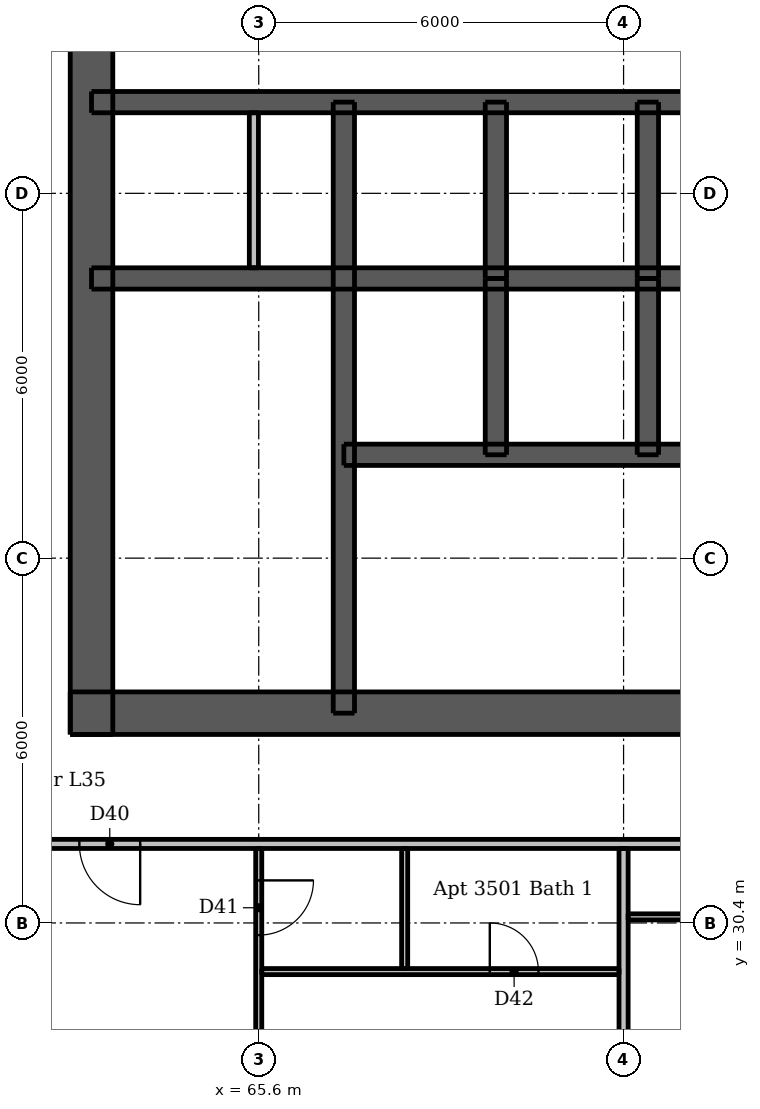
"""IFC4 building model, lengths in metres.
Left out: names, types, materials, properties, quantities, classifications, styles, units other than length and angle.
Written with IfcOpenShell. Run it as: python <this file> out.ifc"""

import sys

from ifc_helpers import new_model, si_unit, direction, frame, frame_2d, origin, place, context, subcontext, project, spatial, rectangle, extrude, element, fill, save


model = new_model("IFC4")
c1 = context("Model", 3, precision=1e-05, world=origin(), true_north=direction((0.0, 1.0)))
c2 = subcontext(c1, "Body", "Model", "MODEL_VIEW")
j1 = project(units=[si_unit("LENGTHUNIT", "METRE"), si_unit("PLANEANGLEUNIT", "RADIAN")], contexts=[c1])
p1 = place(None, origin())
s1 = spatial("IfcSite", under=j1, at=p1, CompositionType="ELEMENT")
p2 = place(p1, origin())
s2 = spatial("IfcBuilding", under=s1, at=p2, CompositionType="ELEMENT")
p3 = place(p2, frame((0.0, 0.0, 133.9)))
s3 = spatial("IfcBuildingStorey", under=s2, at=p3, CompositionType="ELEMENT", Elevation=133.9)
p4 = place(p3, frame((62.5, 33.85, 0.0), z_axis=(0.0, 0.0, 1.0), x_axis=(1.0, 0.0, 0.0)))
e1 = element("IfcWall", 1, at=p4, inside=s3, PredefinedType="SHEAR", context=c2, shape_type="SweptSolid", body=[
    extrude(rectangle(XDim=24.0, YDim=0.7, at=frame_2d((12.0, 0.0))), origin(), (0.0, 0.0, 1.0), 3.05),
])
p5 = place(p4, frame((1.962, 0.0, 0.0)))
e2 = element("IfcOpeningElement", 2, at=p5, cuts=e1, PredefinedType="OPENING", context=c2, shape_type="SweptSolid", body=[
    extrude(rectangle(XDim=1.1, YDim=2.1, at=frame_2d((0.55, 1.05))), frame((0.0, 0.36, 0.0), z_axis=(0.0, -1.0, 0.0), x_axis=(1.0, 0.0, 0.0)), (0.0, 0.0, 1.0), 0.72),
])
p6 = place(p4, frame((20.938, 0.0, 0.0)))
e3 = element("IfcOpeningElement", 3, at=p6, cuts=e1, PredefinedType="OPENING", context=c2, shape_type="SweptSolid", body=[
    extrude(rectangle(XDim=1.1, YDim=2.1, at=frame_2d((0.55, 1.05))), frame((0.0, 0.36, 0.0), z_axis=(0.0, -1.0, 0.0), x_axis=(1.0, 0.0, 0.0)), (0.0, 0.0, 1.0), 0.72),
])
p7 = place(p4, frame((8.0, 0.0, 0.0)))
e4 = element("IfcOpeningElement", 4, at=p7, cuts=e1, PredefinedType="OPENING", context=c2, shape_type="SweptSolid", body=[
    extrude(rectangle(XDim=1.1, YDim=2.1, at=frame_2d((0.55, 1.05))), frame((0.0, 0.36, 0.0), z_axis=(0.0, -1.0, 0.0), x_axis=(1.0, 0.0, 0.0)), (0.0, 0.0, 1.0), 0.72),
])
p8 = place(p4, frame((15.3, 0.0, 0.0)))
e5 = element("IfcOpeningElement", 5, at=p8, cuts=e1, PredefinedType="OPENING", context=c2, shape_type="SweptSolid", body=[
    extrude(rectangle(XDim=0.9, YDim=2.1, at=frame_2d((0.45, 1.05))), frame((0.0, 0.36, 0.0), z_axis=(0.0, -1.0, 0.0), x_axis=(1.0, 0.0, 0.0)), (0.0, 0.0, 1.0), 0.72),
])
p9 = place(p3, frame((62.85, 33.5, 0.0), z_axis=(0.0, 0.0, 1.0), x_axis=(0.0, 1.0, 0.0)))
e6 = element("IfcWall", 6, at=p9, inside=s3, PredefinedType="SHEAR", context=c2, shape_type="SweptSolid", body=[
    extrude(rectangle(XDim=24.0, YDim=0.7, at=frame_2d((12.0, 0.0))), origin(), (0.0, 0.0, 1.0), 3.05),
])
p10 = place(p9, frame((11.2, 0.0, 0.0)))
e7 = element("IfcOpeningElement", 7, at=p10, cuts=e6, PredefinedType="OPENING", context=c2, shape_type="SweptSolid", body=[
    extrude(rectangle(XDim=1.6, YDim=2.1, at=frame_2d((0.8, 1.05))), frame((0.0, 0.36, 0.0), z_axis=(0.0, -1.0, 0.0), x_axis=(1.0, 0.0, 0.0)), (0.0, 0.0, 1.0), 0.72),
])
p11 = place(p3, frame((62.85, 41.0, 0.0), z_axis=(0.0, 0.0, 1.0), x_axis=(1.0, 0.0, 0.0)))
e8 = element("IfcWall", 8, at=p11, inside=s3, PredefinedType="SHEAR", context=c2, shape_type="SweptSolid", body=[
    extrude(rectangle(XDim=23.3, YDim=0.35, at=frame_2d((11.65, 0.0))), origin(), (0.0, 0.0, 1.0), 3.05),
])
p12 = place(p3, frame((62.85, 43.9, 0.0), z_axis=(0.0, 0.0, 1.0), x_axis=(1.0, 0.0, 0.0)))
e9 = element("IfcWall", 9, at=p12, inside=s3, PredefinedType="SHEAR", context=c2, shape_type="SweptSolid", body=[
    extrude(rectangle(XDim=23.3, YDim=0.35, at=frame_2d((11.65, 0.0))), origin(), (0.0, 0.0, 1.0), 3.05),
])
p13 = place(p12, frame((1.06, 0.0, 0.0)))
e10 = element("IfcOpeningElement", 10, at=p13, cuts=e9, PredefinedType="OPENING", context=c2, shape_type="SweptSolid", body=[
    extrude(rectangle(XDim=0.9, YDim=2.1, at=frame_2d((0.45, 1.05))), frame((0.0, 0.185, 0.0), z_axis=(0.0, -1.0, 0.0), x_axis=(1.0, 0.0, 0.0)), (0.0, 0.0, 1.0), 0.37),
])
p14 = place(p12, frame((2.923, 0.0, 0.0)))
e11 = element("IfcOpeningElement", 11, at=p14, cuts=e9, PredefinedType="OPENING", context=c2, shape_type="SweptSolid", body=[
    extrude(rectangle(XDim=0.8, YDim=2.1, at=frame_2d((0.4, 1.05))), frame((0.0, 0.185, 0.0), z_axis=(0.0, -1.0, 0.0), x_axis=(1.0, 0.0, 0.0)), (0.0, 0.0, 1.0), 0.37),
])
p15 = place(p12, frame((20.688, 0.0, 0.0)))
e12 = element("IfcOpeningElement", 12, at=p15, cuts=e9, PredefinedType="OPENING", context=c2, shape_type="SweptSolid", body=[
    extrude(rectangle(XDim=0.9, YDim=2.1, at=frame_2d((0.45, 1.05))), frame((0.0, 0.185, 0.0), z_axis=(0.0, -1.0, 0.0), x_axis=(1.0, 0.0, 0.0)), (0.0, 0.0, 1.0), 0.37),
])
p16 = place(p12, frame((4.85, 0.0, 0.0)))
e13 = element("IfcOpeningElement", 13, at=p16, cuts=e9, PredefinedType="OPENING", context=c2, shape_type="SweptSolid", body=[
    extrude(rectangle(XDim=1.1, YDim=2.1, at=frame_2d((0.55, 1.05))), frame((0.0, 0.185, 0.0), z_axis=(0.0, -1.0, 0.0), x_axis=(1.0, 0.0, 0.0)), (0.0, 0.0, 1.0), 0.37),
])
p17 = place(p12, frame((7.35, 0.0, 0.0)))
e14 = element("IfcOpeningElement", 14, at=p17, cuts=e9, PredefinedType="OPENING", context=c2, shape_type="SweptSolid", body=[
    extrude(rectangle(XDim=1.1, YDim=2.1, at=frame_2d((0.55, 1.05))), frame((0.0, 0.185, 0.0), z_axis=(0.0, -1.0, 0.0), x_axis=(1.0, 0.0, 0.0)), (0.0, 0.0, 1.0), 0.37),
])
p18 = place(p12, frame((9.85, 0.0, 0.0)))
e15 = element("IfcOpeningElement", 15, at=p18, cuts=e9, PredefinedType="OPENING", context=c2, shape_type="SweptSolid", body=[
    extrude(rectangle(XDim=1.1, YDim=2.1, at=frame_2d((0.55, 1.05))), frame((0.0, 0.185, 0.0), z_axis=(0.0, -1.0, 0.0), x_axis=(1.0, 0.0, 0.0)), (0.0, 0.0, 1.0), 0.37),
])
p19 = place(p12, frame((12.35, 0.0, 0.0)))
e16 = element("IfcOpeningElement", 16, at=p19, cuts=e9, PredefinedType="OPENING", context=c2, shape_type="SweptSolid", body=[
    extrude(rectangle(XDim=1.1, YDim=2.1, at=frame_2d((0.55, 1.05))), frame((0.0, 0.185, 0.0), z_axis=(0.0, -1.0, 0.0), x_axis=(1.0, 0.0, 0.0)), (0.0, 0.0, 1.0), 0.37),
])
p20 = place(p12, frame((14.85, 0.0, 0.0)))
e17 = element("IfcOpeningElement", 17, at=p20, cuts=e9, PredefinedType="OPENING", context=c2, shape_type="SweptSolid", body=[
    extrude(rectangle(XDim=1.1, YDim=2.1, at=frame_2d((0.55, 1.05))), frame((0.0, 0.185, 0.0), z_axis=(0.0, -1.0, 0.0), x_axis=(1.0, 0.0, 0.0)), (0.0, 0.0, 1.0), 0.37),
])
p21 = place(p12, frame((17.35, 0.0, 0.0)))
e18 = element("IfcOpeningElement", 18, at=p21, cuts=e9, PredefinedType="OPENING", context=c2, shape_type="SweptSolid", body=[
    extrude(rectangle(XDim=1.1, YDim=2.1, at=frame_2d((0.55, 1.05))), frame((0.0, 0.185, 0.0), z_axis=(0.0, -1.0, 0.0), x_axis=(1.0, 0.0, 0.0)), (0.0, 0.0, 1.0), 0.37),
])
p22 = place(p3, frame((67.0, 33.85, 0.0), z_axis=(0.0, 0.0, 1.0), x_axis=(0.0, 1.0, 0.0)))
e19 = element("IfcWall", 19, at=p22, inside=s3, PredefinedType="SHEAR", context=c2, shape_type="SweptSolid", body=[
    extrude(rectangle(XDim=10.05, YDim=0.35, at=frame_2d((5.025, 0.0))), origin(), (0.0, 0.0, 1.0), 3.05),
])
p23 = place(p22, frame((0.55, 0.0, 0.0)))
e20 = element("IfcOpeningElement", 20, at=p23, cuts=e19, PredefinedType="OPENING", context=c2, shape_type="SweptSolid", body=[
    extrude(rectangle(XDim=1.1, YDim=2.1, at=frame_2d((0.55, 1.05))), frame((0.0, 0.185, 0.0), z_axis=(0.0, -1.0, 0.0), x_axis=(1.0, 0.0, 0.0)), (0.0, 0.0, 1.0), 0.37),
])
for number, where, z_axis, x_axis in (
    (21, (69.5, 41.0, 0.0), (0.0, 0.0, 1.0), (0.0, 1.0, 0.0)),
    (22, (72.0, 41.0, 0.0), (0.0, 0.0, 1.0), (0.0, 1.0, 0.0)),
):
    element("IfcWall", number, at=place(p3, frame(where, z_axis=z_axis, x_axis=x_axis)), inside=s3, PredefinedType="SHEAR", context=c2, shape_type="SweptSolid", body=[
        extrude(rectangle(XDim=2.9, YDim=0.35, at=frame_2d((1.45, 0.0))), origin(), (0.0, 0.0, 1.0), 3.05),
    ])
p24 = place(p3, frame((67.0, 38.1, 0.0), z_axis=(0.0, 0.0, 1.0), x_axis=(1.0, 0.0, 0.0)))
e23 = element("IfcWall", 23, at=p24, inside=s3, PredefinedType="SHEAR", context=c2, shape_type="SweptSolid", body=[
    extrude(rectangle(XDim=7.5, YDim=0.35, at=frame_2d((3.75, 0.0))), origin(), (0.0, 0.0, 1.0), 3.05),
])
p25 = place(p24, frame((0.7, 0.0, 0.0)))
e24 = element("IfcOpeningElement", 24, at=p25, cuts=e23, PredefinedType="OPENING", context=c2, shape_type="SweptSolid", body=[
    extrude(rectangle(XDim=1.1, YDim=2.1, at=frame_2d((0.55, 1.05))), frame((0.0, 0.185, 0.0), z_axis=(0.0, -1.0, 0.0), x_axis=(1.0, 0.0, 0.0)), (0.0, 0.0, 1.0), 0.37),
])
p26 = place(p24, frame((3.2, 0.0, 0.0)))
e25 = element("IfcOpeningElement", 25, at=p26, cuts=e23, PredefinedType="OPENING", context=c2, shape_type="SweptSolid", body=[
    extrude(rectangle(XDim=1.1, YDim=2.1, at=frame_2d((0.55, 1.05))), frame((0.0, 0.185, 0.0), z_axis=(0.0, -1.0, 0.0), x_axis=(1.0, 0.0, 0.0)), (0.0, 0.0, 1.0), 0.37),
])
p27 = place(p24, frame((5.65, 0.0, 0.0)))
e26 = element("IfcOpeningElement", 26, at=p27, cuts=e23, PredefinedType="OPENING", context=c2, shape_type="SweptSolid", body=[
    extrude(rectangle(XDim=1.2, YDim=2.1, at=frame_2d((0.6, 1.05))), frame((0.0, 0.185, 0.0), z_axis=(0.0, -1.0, 0.0), x_axis=(1.0, 0.0, 0.0)), (0.0, 0.0, 1.0), 0.37),
])
for number, where, z_axis, x_axis in (
    (27, (69.5, 38.1, 0.0), (0.0, 0.0, 1.0), (0.0, 1.0, 0.0)),
    (28, (72.0, 38.1, 0.0), (0.0, 0.0, 1.0), (0.0, 1.0, 0.0)),
):
    element("IfcWall", number, at=place(p3, frame(where, z_axis=z_axis, x_axis=x_axis)), inside=s3, PredefinedType="SHEAR", context=c2, shape_type="SweptSolid", body=[
        extrude(rectangle(XDim=2.9, YDim=0.35, at=frame_2d((1.45, 0.0))), origin(), (0.0, 0.0, 1.0), 3.05),
    ])
p28 = place(p3, frame((65.52, 41.175, 0.0), z_axis=(0.0, 0.0, 1.0), x_axis=(0.0, 1.0, 0.0)))
e29 = element("IfcWall", 29, at=p28, inside=s3, PredefinedType="PLUMBINGWALL", context=c2, shape_type="SweptSolid", body=[
    extrude(rectangle(XDim=2.55, YDim=0.15, at=frame_2d((1.275, 0.0))), origin(), (0.0, 0.0, 1.0), 3.05),
])
p29 = place(p3, frame((65.6, 31.625, 0.0), z_axis=(0.0, 0.0, 1.0), x_axis=(0.0, -1.0, 0.0)))
e30 = element("IfcWall", 30, at=p29, inside=s3, PredefinedType="PARTITIONING", context=c2, shape_type="SweptSolid", body=[
    extrude(rectangle(XDim=9.125, YDim=0.1, at=frame_2d((4.562, 0.0))), origin(), (0.0, 0.0, 1.0), 2.516),
])
p30 = place(p29, frame((0.525, 0.0, 0.0)))
e31 = element("IfcOpeningElement", 31, at=p30, cuts=e30, PredefinedType="OPENING", context=c2, shape_type="SweptSolid", body=[
    extrude(rectangle(XDim=0.9, YDim=2.1, at=frame_2d((0.45, 1.05))), frame((0.0, 0.06, 0.0), z_axis=(0.0, -1.0, 0.0), x_axis=(1.0, 0.0, 0.0)), (0.0, 0.0, 1.0), 0.12),
])
p31 = place(p29, frame((5.125, 0.0, 0.0)))
e32 = element("IfcOpeningElement", 32, at=p31, cuts=e30, PredefinedType="OPENING", context=c2, shape_type="SweptSolid", body=[
    extrude(rectangle(XDim=0.9, YDim=2.1, at=frame_2d((0.45, 1.05))), frame((0.0, 0.06, 0.0), z_axis=(0.0, -1.0, 0.0), x_axis=(1.0, 0.0, 0.0)), (0.0, 0.0, 1.0), 0.12),
])
p32 = place(p3, frame((68.0, 29.65, 0.0), z_axis=(0.0, 0.0, 1.0), x_axis=(0.0, 1.0, 0.0)))
e33 = element("IfcWall", 33, at=p32, inside=s3, PredefinedType="PARTITIONING", context=c2, shape_type="SweptSolid", body=[
    extrude(rectangle(XDim=1.975, YDim=0.1, at=frame_2d((0.988, 0.0))), origin(), (0.0, 0.0, 1.0), 3.05),
])
p33 = place(p3, frame((88.25, 30.5, 0.0), z_axis=(0.0, 0.0, 1.0), x_axis=(-1.0, 0.0, 0.0)))
e34 = element("IfcWall", 34, at=p33, inside=s3, PredefinedType="PARTITIONING", context=c2, shape_type="SweptSolid", body=[
    extrude(rectangle(XDim=16.575, YDim=0.1, at=frame_2d((8.288, 0.0))), origin(), (0.0, 0.0, 1.0), 3.05),
])
p34 = place(p33, frame((4.2, 0.0, 0.0)))
e35 = element("IfcOpeningElement", 35, at=p34, cuts=e34, PredefinedType="OPENING", context=c2, shape_type="SweptSolid", body=[
    extrude(rectangle(XDim=0.9, YDim=2.1, at=frame_2d((0.45, 1.05))), frame((0.0, 0.06, 0.0), z_axis=(0.0, -1.0, 0.0), x_axis=(1.0, 0.0, 0.0)), (0.0, 0.0, 1.0), 0.12),
])
p35 = place(p33, frame((0.35, 0.0, 0.0)))
e36 = element("IfcOpeningElement", 36, at=p35, cuts=e34, PredefinedType="OPENING", context=c2, shape_type="SweptSolid", body=[
    extrude(rectangle(XDim=0.9, YDim=2.1, at=frame_2d((0.45, 1.05))), frame((0.0, 0.06, 0.0), z_axis=(0.0, -1.0, 0.0), x_axis=(1.0, 0.0, 0.0)), (0.0, 0.0, 1.0), 0.12),
])
p36 = place(p33, frame((14.65, 0.0, 0.0)))
e37 = element("IfcOpeningElement", 37, at=p36, cuts=e34, PredefinedType="OPENING", context=c2, shape_type="SweptSolid", body=[
    extrude(rectangle(XDim=0.9, YDim=2.1, at=frame_2d((0.45, 1.05))), frame((0.0, 0.06, 0.0), z_axis=(0.0, -1.0, 0.0), x_axis=(1.0, 0.0, 0.0)), (0.0, 0.0, 1.0), 0.12),
])
p37 = place(p33, frame((11.35, 0.0, 0.0)))
e38 = element("IfcOpeningElement", 38, at=p37, cuts=e34, PredefinedType="OPENING", context=c2, shape_type="SweptSolid", body=[
    extrude(rectangle(XDim=0.9, YDim=2.1, at=frame_2d((0.45, 1.05))), frame((0.0, 0.06, 0.0), z_axis=(0.0, -1.0, 0.0), x_axis=(1.0, 0.0, 0.0)), (0.0, 0.0, 1.0), 0.12),
])
p38 = place(p33, frame((8.45, 0.0, 0.0)))
e39 = element("IfcOpeningElement", 39, at=p38, cuts=e34, PredefinedType="OPENING", context=c2, shape_type="SweptSolid", body=[
    extrude(rectangle(XDim=0.8, YDim=2.1, at=frame_2d((0.4, 1.05))), frame((0.0, 0.06, 0.0), z_axis=(0.0, -1.0, 0.0), x_axis=(1.0, 0.0, 0.0)), (0.0, 0.0, 1.0), 0.12),
])
p39 = place(p3, frame((65.65, 29.6, 0.0), z_axis=(0.0, 0.0, 1.0), x_axis=(1.0, 0.0, 0.0)))
e40 = element("IfcWall", 40, at=p39, inside=s3, PredefinedType="PARTITIONING", context=c2, shape_type="SweptSolid", body=[
    extrude(rectangle(XDim=5.875, YDim=0.1, at=frame_2d((2.938, 0.0))), origin(), (0.0, 0.0, 1.0), 3.05),
])
p40 = place(p39, frame((3.75, 0.0, 0.0)))
e41 = element("IfcOpeningElement", 41, at=p40, cuts=e40, PredefinedType="OPENING", context=c2, shape_type="SweptSolid", body=[
    extrude(rectangle(XDim=0.8, YDim=2.1, at=frame_2d((0.4, 1.05))), frame((0.0, 0.06, 0.0), z_axis=(0.0, -1.0, 0.0), x_axis=(1.0, 0.0, 0.0)), (0.0, 0.0, 1.0), 0.12),
])
p41 = place(p3, frame((71.6, 25.5, 0.0), z_axis=(0.0, 0.0, 1.0), x_axis=(0.0, 1.0, 0.0)))
e42 = element("IfcWall", 42, at=p41, inside=s3, PredefinedType="PARTITIONING", context=c2, shape_type="SweptSolid", body=[
    extrude(rectangle(XDim=6.125, YDim=0.15, at=frame_2d((3.062, 0.0))), origin(), (0.0, 0.0, 1.0), 2.59),
])
p42 = place(p3, frame((89.525, 31.7, 0.0), z_axis=(0.0, 0.0, 1.0), x_axis=(-1.0, 0.0, 0.0)))
e43 = element("IfcWall", 43, at=p42, inside=s3, PredefinedType="PARTITIONING", context=c2, shape_type="SweptSolid", body=[
    extrude(rectangle(XDim=28.75, YDim=0.15, at=frame_2d((14.375, 0.0))), origin(), (0.0, 0.0, 1.0), 3.05),
])
p43 = place(p42, frame((25.875, 0.0, 0.0)))
e44 = element("IfcOpeningElement", 44, at=p43, cuts=e43, PredefinedType="OPENING", context=c2, shape_type="SweptSolid", body=[
    extrude(rectangle(XDim=1.0, YDim=2.1, at=frame_2d((0.5, 1.05))), frame((0.0, 0.085, 0.0), z_axis=(0.0, -1.0, 0.0), x_axis=(1.0, 0.0, 0.0)), (0.0, 0.0, 1.0), 0.17),
])
p44 = place(p42, frame((9.075, 0.0, 0.0)))
e45 = element("IfcOpeningElement", 45, at=p44, cuts=e43, PredefinedType="OPENING", context=c2, shape_type="SweptSolid", body=[
    extrude(rectangle(XDim=1.0, YDim=2.1, at=frame_2d((0.5, 1.05))), frame((0.0, 0.085, 0.0), z_axis=(0.0, -1.0, 0.0), x_axis=(1.0, 0.0, 0.0)), (0.0, 0.0, 1.0), 0.17),
])
p45 = place(p5, origin())
e46 = element("IfcDoor", 46, at=p45, inside=s3, OperationType="SINGLE_SWING_LEFT", PredefinedType="DOOR", context=c2, shape_type="SweptSolid", body=[
    extrude(rectangle(XDim=1.1, YDim=2.1, at=frame_2d((0.55, 1.05))), frame((0.0, 0.337, 0.0), z_axis=(0.0, -1.0, 0.0), x_axis=(1.0, 0.0, 0.0)), (0.0, 0.0, 1.0), 0.05),
])
fill(e2, e46)
p46 = place(p10, origin())
e47 = element("IfcDoor", 47, at=p46, inside=s3, OperationType="DOUBLE_DOOR_SINGLE_SWING", PredefinedType="DOOR", context=c2, shape_type="SweptSolid", body=[
    extrude(rectangle(XDim=1.6, YDim=2.1, at=frame_2d((0.8, 1.05))), frame((0.0, -0.288, 0.0), z_axis=(0.0, -1.0, 0.0), x_axis=(1.0, 0.0, 0.0)), (0.0, 0.0, 1.0), 0.05),
])
fill(e7, e47)
p47 = place(p7, origin())
e48 = element("IfcDoor", 48, at=p47, inside=s3, OperationType="SINGLE_SWING_LEFT", PredefinedType="DOOR", context=c2, shape_type="SweptSolid", body=[
    extrude(rectangle(XDim=1.1, YDim=2.1, at=frame_2d((0.55, 1.05))), frame((0.0, 0.337, 0.0), z_axis=(0.0, -1.0, 0.0), x_axis=(1.0, 0.0, 0.0)), (0.0, 0.0, 1.0), 0.05),
])
fill(e4, e48)
p48 = place(p23, origin())
e49 = element("IfcDoor", 49, at=p48, inside=s3, OperationType="SINGLE_SWING_RIGHT", PredefinedType="DOOR", context=c2, shape_type="SweptSolid", body=[
    extrude(rectangle(XDim=1.1, YDim=2.1, at=frame_2d((0.55, 1.05))), frame((0.0, -0.112, 0.0), z_axis=(0.0, -1.0, 0.0), x_axis=(1.0, 0.0, 0.0)), (0.0, 0.0, 1.0), 0.05),
])
fill(e20, e49)
p49 = place(p13, origin())
e50 = element("IfcDoor", 50, at=p49, inside=s3, OperationType="SINGLE_SWING_LEFT", PredefinedType="DOOR", context=c2, shape_type="SweptSolid", body=[
    extrude(rectangle(XDim=0.9, YDim=2.1, at=frame_2d((0.45, 1.05))), frame((0.0, -0.112, 0.0), z_axis=(0.0, -1.0, 0.0), x_axis=(1.0, 0.0, 0.0)), (0.0, 0.0, 1.0), 0.05),
])
fill(e10, e50)
p50 = place(p14, origin())
e51 = element("IfcDoor", 51, at=p50, inside=s3, OperationType="SINGLE_SWING_RIGHT", PredefinedType="DOOR", context=c2, shape_type="SweptSolid", body=[
    extrude(rectangle(XDim=0.8, YDim=2.1, at=frame_2d((0.4, 1.05))), frame((0.0, -0.112, 0.0), z_axis=(0.0, -1.0, 0.0), x_axis=(1.0, 0.0, 0.0)), (0.0, 0.0, 1.0), 0.05),
])
fill(e11, e51)
p51 = place(p16, origin())
e52 = element("IfcDoor", 52, at=p51, inside=s3, OperationType="DOUBLE_DOOR_SLIDING", PredefinedType="DOOR", context=c2, shape_type="SweptSolid", body=[
    extrude(rectangle(XDim=1.1, YDim=2.1, at=frame_2d((0.55, 1.05))), frame((0.0, 0.025, 0.0), z_axis=(0.0, -1.0, 0.0), x_axis=(1.0, 0.0, 0.0)), (0.0, 0.0, 1.0), 0.05),
])
fill(e13, e52)
p52 = place(p17, origin())
e53 = element("IfcDoor", 53, at=p52, inside=s3, OperationType="DOUBLE_DOOR_SLIDING", PredefinedType="DOOR", context=c2, shape_type="SweptSolid", body=[
    extrude(rectangle(XDim=1.1, YDim=2.1, at=frame_2d((0.55, 1.05))), frame((0.0, 0.025, 0.0), z_axis=(0.0, -1.0, 0.0), x_axis=(1.0, 0.0, 0.0)), (0.0, 0.0, 1.0), 0.05),
])
fill(e14, e53)
p53 = place(p25, origin())
e54 = element("IfcDoor", 54, at=p53, inside=s3, OperationType="DOUBLE_DOOR_SLIDING", PredefinedType="DOOR", context=c2, shape_type="SweptSolid", body=[
    extrude(rectangle(XDim=1.1, YDim=2.1, at=frame_2d((0.55, 1.05))), frame((0.0, 0.025, 0.0), z_axis=(0.0, -1.0, 0.0), x_axis=(1.0, 0.0, 0.0)), (0.0, 0.0, 1.0), 0.05),
])
fill(e24, e54)
p54 = place(p26, origin())
e55 = element("IfcDoor", 55, at=p54, inside=s3, OperationType="DOUBLE_DOOR_SLIDING", PredefinedType="DOOR", context=c2, shape_type="SweptSolid", body=[
    extrude(rectangle(XDim=1.1, YDim=2.1, at=frame_2d((0.55, 1.05))), frame((0.0, 0.025, 0.0), z_axis=(0.0, -1.0, 0.0), x_axis=(1.0, 0.0, 0.0)), (0.0, 0.0, 1.0), 0.05),
])
fill(e25, e55)
p55 = place(p43, origin())
e56 = element("IfcDoor", 56, at=p55, inside=s3, OperationType="SINGLE_SWING_LEFT", PredefinedType="DOOR", context=c2, shape_type="SweptSolid", body=[
    extrude(rectangle(XDim=1.0, YDim=2.1, at=frame_2d((0.5, 1.05))), frame((0.0, 0.025, 0.0), z_axis=(0.0, -1.0, 0.0), x_axis=(1.0, 0.0, 0.0)), (0.0, 0.0, 1.0), 0.05),
])
fill(e44, e56)
p56 = place(p30, origin())
e57 = element("IfcDoor", 57, at=p56, inside=s3, OperationType="SINGLE_SWING_LEFT", PredefinedType="DOOR", context=c2, shape_type="SweptSolid", body=[
    extrude(rectangle(XDim=0.9, YDim=2.1, at=frame_2d((0.45, 1.05))), frame((0.0, 0.025, 0.0), z_axis=(0.0, -1.0, 0.0), x_axis=(1.0, 0.0, 0.0)), (0.0, 0.0, 1.0), 0.05),
])
fill(e31, e57)
p57 = place(p40, origin())
e58 = element("IfcDoor", 58, at=p57, inside=s3, OperationType="SINGLE_SWING_LEFT", PredefinedType="DOOR", context=c2, shape_type="SweptSolid", body=[
    extrude(rectangle(XDim=0.8, YDim=2.1, at=frame_2d((0.4, 1.05))), frame((0.0, 0.025, 0.0), z_axis=(0.0, -1.0, 0.0), x_axis=(1.0, 0.0, 0.0)), (0.0, 0.0, 1.0), 0.05),
])
fill(e41, e58)
save(model, sys.argv[1])
